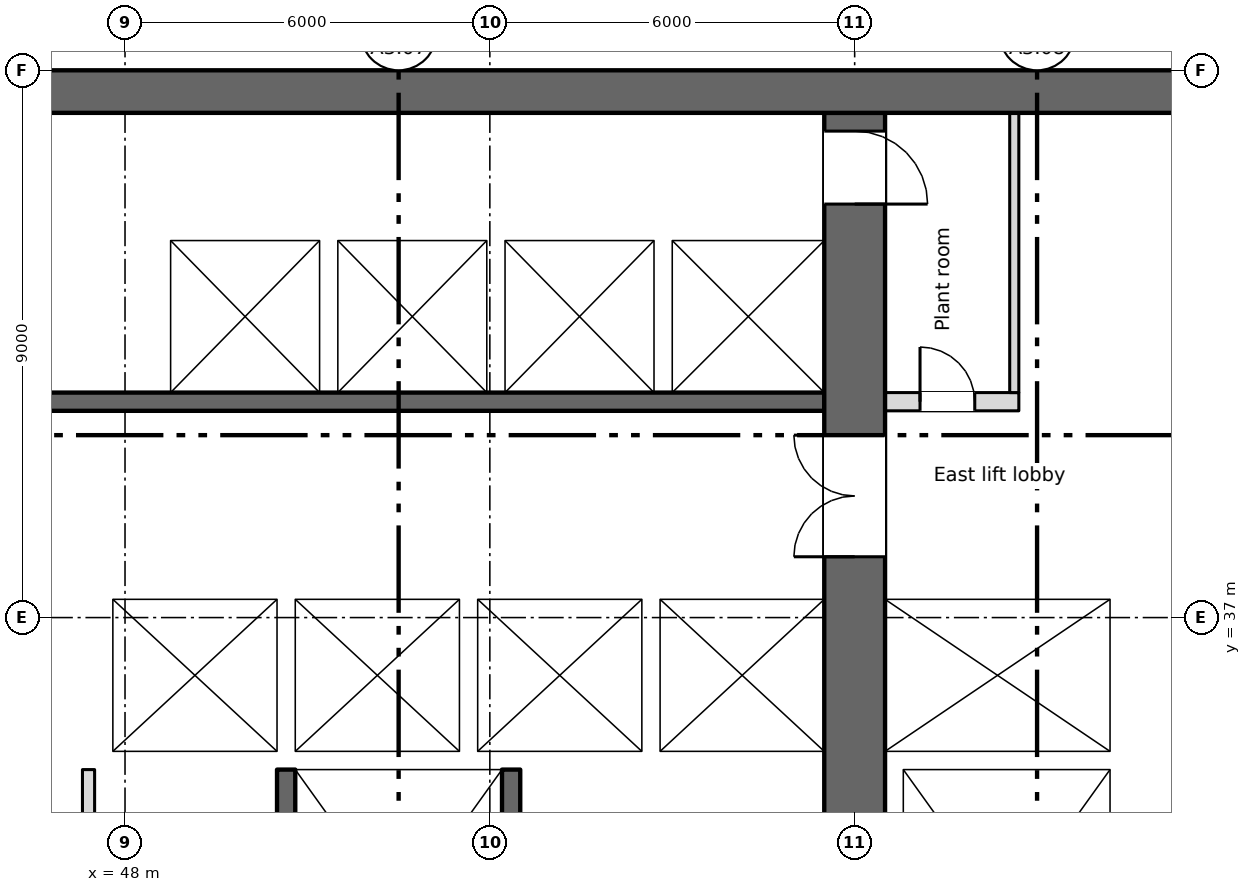
"""IFC4 building model, lengths in metres.
Left out: names, types, materials, properties, quantities, classifications, styles, units other than length and angle.
Written with IfcOpenShell. Run it as: python <this file> out.ifc"""

import sys

from ifc_helpers import new_model, si_unit, direction, frame, frame_2d, origin, place, context, subcontext, project, spatial, rectangle, extrude, element, fill, save


model = new_model("IFC4")
c1 = context("Model", 3, precision=1e-05, world=origin(), true_north=direction((0.0, 1.0)))
c2 = subcontext(c1, "Body", "Model", "MODEL_VIEW")
j1 = project(units=[si_unit("LENGTHUNIT", "METRE"), si_unit("PLANEANGLEUNIT", "RADIAN")], contexts=[c1])
p1 = place(None, origin())
s1 = spatial("IfcSite", under=j1, at=p1, CompositionType="ELEMENT")
p2 = place(p1, origin())
s2 = spatial("IfcBuilding", under=s1, at=p2, CompositionType="ELEMENT")
p3 = place(p2, frame((0.0, 0.0, 226.75)))
s3 = spatial("IfcBuildingStorey", under=s2, at=p3, CompositionType="ELEMENT", Elevation=226.75)
p4 = place(p3, frame((11.55, 45.65, 0.0), z_axis=(0.0, 0.0, 1.0), x_axis=(1.0, 0.0, 0.0)))
e1 = element("IfcWall", 1, at=p4, inside=s3, PredefinedType="SHEAR", context=c2, shape_type="SweptSolid", body=[
    extrude(rectangle(XDim=54.9, YDim=0.7, at=frame_2d((27.45, 0.0))), origin(), (0.0, 0.0, 1.0), 4.2),
])
p5 = place(p3, frame((64.35, 34.8, 0.0), z_axis=(0.0, 0.0, 1.0), x_axis=(0.0, 1.0, 0.0)))
e2 = element("IfcWall", 2, at=p5, inside=s3, PredefinedType="SHEAR", context=c2, shape_type="SweptSolid", body=[
    extrude(rectangle(XDim=10.5, YDim=0.3, at=frame_2d((5.25, 0.0))), origin(), (0.0, 0.0, 1.0), 4.2),
])
p6 = place(p3, frame((60.0, 28.4, 0.0), z_axis=(0.0, 0.0, 1.0), x_axis=(0.0, 1.0, 0.0)))
e3 = element("IfcWall", 3, at=p6, inside=s3, PredefinedType="SHEAR", context=c2, shape_type="SweptSolid", body=[
    extrude(rectangle(XDim=16.9, YDim=1.0, at=frame_2d((8.45, 0.0))), origin(), (0.0, 0.0, 1.0), 4.2),
])
p7 = place(p6, frame((9.6, 0.0, 0.0)))
e4 = element("IfcOpeningElement", 4, at=p7, cuts=e3, PredefinedType="OPENING", context=c2, shape_type="SweptSolid", body=[
    extrude(rectangle(XDim=2.0, YDim=2.1, at=frame_2d((1.0, 1.05))), frame((0.0, 0.51, 0.0), z_axis=(0.0, -1.0, 0.0), x_axis=(1.0, 0.0, 0.0)), (0.0, 0.0, 1.0), 1.02),
])
p8 = place(p6, frame((15.4, 0.0, 0.0)))
e5 = element("IfcOpeningElement", 5, at=p8, cuts=e3, PredefinedType="OPENING", context=c2, shape_type="SweptSolid", body=[
    extrude(rectangle(XDim=1.2, YDim=2.1, at=frame_2d((0.6, 1.05))), frame((0.0, 0.51, 0.0), z_axis=(0.0, -1.0, 0.0), x_axis=(1.0, 0.0, 0.0)), (0.0, 0.0, 1.0), 1.02),
])
p9 = place(p3, frame((50.65, 34.5, 0.0), z_axis=(0.0, 0.0, 1.0), x_axis=(0.0, -1.0, 0.0)))
e6 = element("IfcWall", 6, at=p9, inside=s3, PredefinedType="SHEAR", context=c2, shape_type="SweptSolid", body=[
    extrude(rectangle(XDim=6.1, YDim=0.3, at=frame_2d((3.05, 0.0))), origin(), (0.0, 0.0, 1.0), 4.2),
])
p10 = place(p9, frame((4.95, 0.0, 0.0)))
e7 = element("IfcOpeningElement", 7, at=p10, cuts=e6, PredefinedType="OPENING", context=c2, shape_type="SweptSolid", body=[
    extrude(rectangle(XDim=1.1, YDim=2.1, at=frame_2d((0.55, 1.05))), frame((0.0, 0.16, 0.0), z_axis=(0.0, -1.0, 0.0), x_axis=(1.0, 0.0, 0.0)), (0.0, 0.0, 1.0), 0.32),
])
p11 = place(p3, frame((54.35, 28.4, 0.0), z_axis=(0.0, 0.0, 1.0), x_axis=(0.0, 1.0, 0.0)))
e8 = element("IfcWall", 8, at=p11, inside=s3, PredefinedType="SHEAR", context=c2, shape_type="SweptSolid", body=[
    extrude(rectangle(XDim=6.1, YDim=0.3, at=frame_2d((3.05, 0.0))), origin(), (0.0, 0.0, 1.0), 4.2),
])
p12 = place(p11, frame((0.1, 0.0, 0.0)))
e9 = element("IfcOpeningElement", 9, at=p12, cuts=e8, PredefinedType="OPENING", context=c2, shape_type="SweptSolid", body=[
    extrude(rectangle(XDim=1.0, YDim=2.1, at=frame_2d((0.5, 1.05))), frame((0.0, 0.16, 0.0), z_axis=(0.0, -1.0, 0.0), x_axis=(1.0, 0.0, 0.0)), (0.0, 0.0, 1.0), 0.32),
])
for number, where, z_axis, x_axis in (
    (10, (60.65, 28.4, 0.0), (0.0, 0.0, 1.0), (0.0, 1.0, 0.0)),
    (11, (64.35, 28.4, 0.0), (0.0, 0.0, 1.0), (0.0, 1.0, 0.0)),
):
    element("IfcWall", number, at=place(p3, frame(where, z_axis=z_axis, x_axis=x_axis)), inside=s3, PredefinedType="SHEAR", context=c2, shape_type="SweptSolid", body=[
        extrude(rectangle(XDim=6.1, YDim=0.3, at=frame_2d((3.05, 0.0))), origin(), (0.0, 0.0, 1.0), 4.2),
    ])
p13 = place(p3, frame((47.3, 34.65, 0.0), z_axis=(0.0, 0.0, 1.0), x_axis=(1.0, 0.0, 0.0)))
e12 = element("IfcWall", 12, at=p13, inside=s3, PredefinedType="SHEAR", context=c2, shape_type="SweptSolid", body=[
    extrude(rectangle(XDim=12.2, YDim=0.3, at=frame_2d((6.1, 0.0))), origin(), (0.0, 0.0, 1.0), 4.2),
])
p14 = place(p13, frame((1.3, 0.0, 0.0)))
e13 = element("IfcOpeningElement", 13, at=p14, cuts=e12, PredefinedType="OPENING", context=c2, shape_type="SweptSolid", body=[
    extrude(rectangle(XDim=1.1, YDim=2.1, at=frame_2d((0.55, 1.05))), frame((0.0, 0.16, 0.0), z_axis=(0.0, -1.0, 0.0), x_axis=(1.0, 0.0, 0.0)), (0.0, 0.0, 1.0), 0.32),
])
p15 = place(p3, frame((60.5, 34.65, 0.0), z_axis=(0.0, 0.0, 1.0), x_axis=(1.0, 0.0, 0.0)))
e14 = element("IfcWall", 14, at=p15, inside=s3, PredefinedType="SHEAR", context=c2, shape_type="SweptSolid", body=[
    extrude(rectangle(XDim=4.0, YDim=0.3, at=frame_2d((2.0, 0.0))), origin(), (0.0, 0.0, 1.0), 4.2),
])
p16 = place(p3, frame((47.3, 37.45, 0.0), z_axis=(0.0, 0.0, 1.0), x_axis=(1.0, 0.0, 0.0)))
e15 = element("IfcWall", 15, at=p16, inside=s3, PredefinedType="SHEAR", context=c2, shape_type="SweptSolid", body=[
    extrude(rectangle(XDim=12.2, YDim=0.3, at=frame_2d((6.1, 0.0))), origin(), (0.0, 0.0, 1.0), 4.2),
])
p17 = place(p16, frame((4.3, 0.0, 0.0)))
e16 = element("IfcOpeningElement", 16, at=p17, cuts=e15, PredefinedType="OPENING", context=c2, shape_type="SweptSolid", body=[
    extrude(rectangle(XDim=1.1, YDim=2.1, at=frame_2d((0.55, 1.05))), frame((0.0, 0.16, 0.0), z_axis=(0.0, -1.0, 0.0), x_axis=(1.0, 0.0, 0.0)), (0.0, 0.0, 1.0), 0.32),
])
p18 = place(p16, frame((7.3, 0.0, 0.0)))
e17 = element("IfcOpeningElement", 17, at=p18, cuts=e15, PredefinedType="OPENING", context=c2, shape_type="SweptSolid", body=[
    extrude(rectangle(XDim=1.1, YDim=2.1, at=frame_2d((0.55, 1.05))), frame((0.0, 0.16, 0.0), z_axis=(0.0, -1.0, 0.0), x_axis=(1.0, 0.0, 0.0)), (0.0, 0.0, 1.0), 0.32),
])
p19 = place(p16, frame((10.3, 0.0, 0.0)))
e18 = element("IfcOpeningElement", 18, at=p19, cuts=e15, PredefinedType="OPENING", context=c2, shape_type="SweptSolid", body=[
    extrude(rectangle(XDim=1.1, YDim=2.1, at=frame_2d((0.55, 1.05))), frame((0.0, 0.16, 0.0), z_axis=(0.0, -1.0, 0.0), x_axis=(1.0, 0.0, 0.0)), (0.0, 0.0, 1.0), 0.32),
])
p20 = place(p3, frame((60.5, 37.45, 0.0), z_axis=(0.0, 0.0, 1.0), x_axis=(1.0, 0.0, 0.0)))
e19 = element("IfcWall", 19, at=p20, inside=s3, PredefinedType="SHEAR", context=c2, shape_type="SweptSolid", body=[
    extrude(rectangle(XDim=3.7, YDim=0.3, at=frame_2d((1.85, 0.0))), origin(), (0.0, 0.0, 1.0), 4.2),
])
p21 = place(p20, frame((1.3, 0.0, 0.0)))
e20 = element("IfcOpeningElement", 20, at=p21, cuts=e19, PredefinedType="OPENING", context=c2, shape_type="SweptSolid", body=[
    extrude(rectangle(XDim=1.1, YDim=2.1, at=frame_2d((0.55, 1.05))), frame((0.0, 0.16, 0.0), z_axis=(0.0, -1.0, 0.0), x_axis=(1.0, 0.0, 0.0)), (0.0, 0.0, 1.0), 0.32),
])
p22 = place(p3, frame((47.55, 34.8, 0.0), z_axis=(0.0, 0.0, 1.0), x_axis=(0.0, 1.0, 0.0)))
e21 = element("IfcWall", 21, at=p22, inside=s3, PredefinedType="SHEAR", context=c2, shape_type="SweptSolid", body=[
    extrude(rectangle(XDim=2.5, YDim=0.5, at=frame_2d((1.25, 0.0))), origin(), (0.0, 0.0, 1.0), 4.2),
])
p23 = place(p3, frame((50.65, 34.8, 0.0), z_axis=(0.0, 0.0, 1.0), x_axis=(0.0, 1.0, 0.0)))
e22 = element("IfcWall", 22, at=p23, inside=s3, PredefinedType="SHEAR", context=c2, shape_type="SweptSolid", body=[
    extrude(rectangle(XDim=2.5, YDim=0.3, at=frame_2d((1.25, 0.0))), origin(), (0.0, 0.0, 1.0), 4.2),
])
p24 = place(p3, frame((18.5, 40.55, 0.0), z_axis=(0.0, 0.0, 1.0), x_axis=(1.0, 0.0, 0.0)))
e23 = element("IfcWall", 23, at=p24, inside=s3, PredefinedType="SHEAR", context=c2, shape_type="SweptSolid", body=[
    extrude(rectangle(XDim=41.0, YDim=0.3, at=frame_2d((20.5, 0.0))), origin(), (0.0, 0.0, 1.0), 4.2),
])
p25 = place(p24, frame((2.15, 0.0, 0.0)))
e24 = element("IfcOpeningElement", 24, at=p25, cuts=e23, PredefinedType="OPENING", context=c2, shape_type="SweptSolid", body=[
    extrude(rectangle(XDim=0.9, YDim=2.1, at=frame_2d((0.45, 1.05))), frame((0.0, 0.16, 0.0), z_axis=(0.0, -1.0, 0.0), x_axis=(1.0, 0.0, 0.0)), (0.0, 0.0, 1.0), 0.32),
])
p26 = place(p24, frame((15.9, 0.0, 0.0)))
e25 = element("IfcOpeningElement", 25, at=p26, cuts=e23, PredefinedType="OPENING", context=c2, shape_type="SweptSolid", body=[
    extrude(rectangle(XDim=0.9, YDim=2.1, at=frame_2d((0.45, 1.05))), frame((0.0, 0.16, 0.0), z_axis=(0.0, -1.0, 0.0), x_axis=(1.0, 0.0, 0.0)), (0.0, 0.0, 1.0), 0.32),
])
p27 = place(p24, frame((21.4, 0.0, 0.0)))
e26 = element("IfcOpeningElement", 26, at=p27, cuts=e23, PredefinedType="OPENING", context=c2, shape_type="SweptSolid", body=[
    extrude(rectangle(XDim=0.9, YDim=2.1, at=frame_2d((0.45, 1.05))), frame((0.0, 0.16, 0.0), z_axis=(0.0, -1.0, 0.0), x_axis=(1.0, 0.0, 0.0)), (0.0, 0.0, 1.0), 0.32),
])
p28 = place(p24, frame((26.9, 0.0, 0.0)))
e27 = element("IfcOpeningElement", 27, at=p28, cuts=e23, PredefinedType="OPENING", context=c2, shape_type="SweptSolid", body=[
    extrude(rectangle(XDim=0.9, YDim=2.1, at=frame_2d((0.45, 1.05))), frame((0.0, 0.16, 0.0), z_axis=(0.0, -1.0, 0.0), x_axis=(1.0, 0.0, 0.0)), (0.0, 0.0, 1.0), 0.32),
])
p29 = place(p24, frame((6.175, 0.0, 0.0)))
e28 = element("IfcOpeningElement", 28, at=p29, cuts=e23, PredefinedType="OPENING", context=c2, shape_type="SweptSolid", body=[
    extrude(rectangle(XDim=1.1, YDim=2.1, at=frame_2d((0.55, 1.05))), frame((0.0, 0.16, 0.0), z_axis=(0.0, -1.0, 0.0), x_axis=(1.0, 0.0, 0.0)), (0.0, 0.0, 1.0), 0.32),
])
p30 = place(p24, frame((8.925, 0.0, 0.0)))
e29 = element("IfcOpeningElement", 29, at=p30, cuts=e23, PredefinedType="OPENING", context=c2, shape_type="SweptSolid", body=[
    extrude(rectangle(XDim=1.1, YDim=2.1, at=frame_2d((0.55, 1.05))), frame((0.0, 0.16, 0.0), z_axis=(0.0, -1.0, 0.0), x_axis=(1.0, 0.0, 0.0)), (0.0, 0.0, 1.0), 0.32),
])
p31 = place(p24, frame((11.675, 0.0, 0.0)))
e30 = element("IfcOpeningElement", 30, at=p31, cuts=e23, PredefinedType="OPENING", context=c2, shape_type="SweptSolid", body=[
    extrude(rectangle(XDim=1.1, YDim=2.1, at=frame_2d((0.55, 1.05))), frame((0.0, 0.16, 0.0), z_axis=(0.0, -1.0, 0.0), x_axis=(1.0, 0.0, 0.0)), (0.0, 0.0, 1.0), 0.32),
])
p32 = place(p24, frame((30.925, 0.0, 0.0)))
e31 = element("IfcOpeningElement", 31, at=p32, cuts=e23, PredefinedType="OPENING", context=c2, shape_type="SweptSolid", body=[
    extrude(rectangle(XDim=1.1, YDim=2.1, at=frame_2d((0.55, 1.05))), frame((0.0, 0.16, 0.0), z_axis=(0.0, -1.0, 0.0), x_axis=(1.0, 0.0, 0.0)), (0.0, 0.0, 1.0), 0.32),
])
p33 = place(p24, frame((33.675, 0.0, 0.0)))
e32 = element("IfcOpeningElement", 32, at=p33, cuts=e23, PredefinedType="OPENING", context=c2, shape_type="SweptSolid", body=[
    extrude(rectangle(XDim=1.1, YDim=2.1, at=frame_2d((0.55, 1.05))), frame((0.0, 0.16, 0.0), z_axis=(0.0, -1.0, 0.0), x_axis=(1.0, 0.0, 0.0)), (0.0, 0.0, 1.0), 0.32),
])
p34 = place(p24, frame((36.375, 0.0, 0.0)))
e33 = element("IfcOpeningElement", 33, at=p34, cuts=e23, PredefinedType="OPENING", context=c2, shape_type="SweptSolid", body=[
    extrude(rectangle(XDim=1.2, YDim=2.1, at=frame_2d((0.6, 1.05))), frame((0.0, 0.16, 0.0), z_axis=(0.0, -1.0, 0.0), x_axis=(1.0, 0.0, 0.0)), (0.0, 0.0, 1.0), 0.32),
])
p35 = place(p24, frame((39.15, 0.0, 0.0)))
e34 = element("IfcOpeningElement", 34, at=p35, cuts=e23, PredefinedType="OPENING", context=c2, shape_type="SweptSolid", body=[
    extrude(rectangle(XDim=1.2, YDim=2.1, at=frame_2d((0.6, 1.05))), frame((0.0, 0.16, 0.0), z_axis=(0.0, -1.0, 0.0), x_axis=(1.0, 0.0, 0.0)), (0.0, 0.0, 1.0), 0.32),
])
p36 = place(p3, frame((18.5, 43.35, 0.0), z_axis=(0.0, 0.0, 1.0), x_axis=(1.0, 0.0, 0.0)))
e35 = element("IfcWall", 35, at=p36, inside=s3, PredefinedType="SHEAR", context=c2, shape_type="SweptSolid", body=[
    extrude(rectangle(XDim=41.0, YDim=0.3, at=frame_2d((20.5, 0.0))), origin(), (0.0, 0.0, 1.0), 4.2),
])
p37 = place(p3, frame((60.5, 40.55, 0.0), z_axis=(0.0, 0.0, 1.0), x_axis=(1.0, 0.0, 0.0)))
e36 = element("IfcWall", 36, at=p37, inside=s3, PredefinedType="PARTITIONING", context=c2, shape_type="SweptSolid", body=[
    extrude(rectangle(XDim=2.2, YDim=0.3, at=frame_2d((1.1, 0.0))), origin(), (0.0, 0.0, 1.0), 4.2),
])
p38 = place(p37, frame((0.575, 0.0, 0.0)))
e37 = element("IfcOpeningElement", 37, at=p38, cuts=e36, PredefinedType="OPENING", context=c2, shape_type="SweptSolid", body=[
    extrude(rectangle(XDim=0.9, YDim=2.1, at=frame_2d((0.45, 1.05))), frame((0.0, 0.16, 0.0), z_axis=(0.0, -1.0, 0.0), x_axis=(1.0, 0.0, 0.0)), (0.0, 0.0, 1.0), 0.32),
])
for number, where, z_axis, x_axis in (
    (38, (53.65, 34.8, 0.0), (0.0, 0.0, 1.0), (0.0, 1.0, 0.0)),
    (39, (56.65, 34.8, 0.0), (0.0, 0.0, 1.0), (0.0, 1.0, 0.0)),
    (40, (48.6, 40.7, 0.0), (0.0, 0.0, 1.0), (0.0, 1.0, 0.0)),
    (41, (51.35, 40.7, 0.0), (0.0, 0.0, 1.0), (0.0, 1.0, 0.0)),
    (42, (54.1, 40.7, 0.0), (0.0, 0.0, 1.0), (0.0, 1.0, 0.0)),
    (43, (56.85, 40.7, 0.0), (0.0, 0.0, 1.0), (0.0, 1.0, 0.0)),
):
    element("IfcWall", number, at=place(p3, frame(where, z_axis=z_axis, x_axis=x_axis)), inside=s3, PredefinedType="SHEAR", context=c2, shape_type="SweptSolid", body=[
        extrude(rectangle(XDim=2.5, YDim=0.3, at=frame_2d((1.25, 0.0))), origin(), (0.0, 0.0, 1.0), 4.2),
    ])
p39 = place(p3, frame((47.4, 28.4, 0.0), z_axis=(0.0, 0.0, 1.0), x_axis=(0.0, 1.0, 0.0)))
e44 = element("IfcWall", 44, at=p39, inside=s3, PredefinedType="PARTITIONING", context=c2, shape_type="SweptSolid", body=[
    extrude(rectangle(XDim=6.1, YDim=0.2, at=frame_2d((3.05, 0.0))), origin(), (0.0, 0.0, 1.0), 4.2),
])
p40 = place(p3, frame((62.625, 40.7, 0.0), z_axis=(0.0, 0.0, 1.0), x_axis=(0.0, 1.0, 0.0)))
e45 = element("IfcWall", 45, at=p40, inside=s3, PredefinedType="PARTITIONING", context=c2, shape_type="SweptSolid", body=[
    extrude(rectangle(XDim=4.6, YDim=0.15, at=frame_2d((2.3, 0.0))), origin(), (0.0, 0.0, 1.0), 4.2),
])
p41 = place(p38, origin())
e46 = element("IfcDoor", 46, at=p41, inside=s3, OperationType="SINGLE_SWING_LEFT", PredefinedType="DOOR", context=c2, shape_type="SweptSolid", body=[
    extrude(rectangle(XDim=0.9, YDim=2.1, at=frame_2d((0.45, 1.05))), frame((0.0, 0.025, 0.0), z_axis=(0.0, -1.0, 0.0), x_axis=(1.0, 0.0, 0.0)), (0.0, 0.0, 1.0), 0.05),
])
fill(e37, e46)
p42 = place(p17, origin())
e47 = element("IfcDoor", 47, at=p42, inside=s3, OperationType="SLIDING_TO_LEFT", PredefinedType="DOOR", context=c2, shape_type="SweptSolid", body=[
    extrude(rectangle(XDim=1.1, YDim=2.1, at=frame_2d((0.55, 1.05))), frame((0.0, 0.025, 0.0), z_axis=(0.0, -1.0, 0.0), x_axis=(1.0, 0.0, 0.0)), (0.0, 0.0, 1.0), 0.05),
])
fill(e16, e47)
p43 = place(p18, origin())
e48 = element("IfcDoor", 48, at=p43, inside=s3, OperationType="SLIDING_TO_LEFT", PredefinedType="DOOR", context=c2, shape_type="SweptSolid", body=[
    extrude(rectangle(XDim=1.1, YDim=2.1, at=frame_2d((0.55, 1.05))), frame((0.0, 0.025, 0.0), z_axis=(0.0, -1.0, 0.0), x_axis=(1.0, 0.0, 0.0)), (0.0, 0.0, 1.0), 0.05),
])
fill(e17, e48)
p44 = place(p19, origin())
e49 = element("IfcDoor", 49, at=p44, inside=s3, OperationType="SLIDING_TO_LEFT", PredefinedType="DOOR", context=c2, shape_type="SweptSolid", body=[
    extrude(rectangle(XDim=1.1, YDim=2.1, at=frame_2d((0.55, 1.05))), frame((0.0, 0.025, 0.0), z_axis=(0.0, -1.0, 0.0), x_axis=(1.0, 0.0, 0.0)), (0.0, 0.0, 1.0), 0.05),
])
fill(e18, e49)
p45 = place(p32, origin())
e50 = element("IfcDoor", 50, at=p45, inside=s3, OperationType="SLIDING_TO_LEFT", PredefinedType="DOOR", context=c2, shape_type="SweptSolid", body=[
    extrude(rectangle(XDim=1.1, YDim=2.1, at=frame_2d((0.55, 1.05))), frame((0.0, 0.025, 0.0), z_axis=(0.0, -1.0, 0.0), x_axis=(1.0, 0.0, 0.0)), (0.0, 0.0, 1.0), 0.05),
])
fill(e31, e50)
p46 = place(p33, origin())
e51 = element("IfcDoor", 51, at=p46, inside=s3, OperationType="SLIDING_TO_LEFT", PredefinedType="DOOR", context=c2, shape_type="SweptSolid", body=[
    extrude(rectangle(XDim=1.1, YDim=2.1, at=frame_2d((0.55, 1.05))), frame((0.0, 0.025, 0.0), z_axis=(0.0, -1.0, 0.0), x_axis=(1.0, 0.0, 0.0)), (0.0, 0.0, 1.0), 0.05),
])
fill(e32, e51)
p47 = place(p34, origin())
e52 = element("IfcDoor", 52, at=p47, inside=s3, OperationType="SLIDING_TO_LEFT", PredefinedType="DOOR", context=c2, shape_type="SweptSolid", body=[
    extrude(rectangle(XDim=1.2, YDim=2.1, at=frame_2d((0.6, 1.05))), frame((0.0, 0.025, 0.0), z_axis=(0.0, -1.0, 0.0), x_axis=(1.0, 0.0, 0.0)), (0.0, 0.0, 1.0), 0.05),
])
fill(e33, e52)
p48 = place(p35, origin())
e53 = element("IfcDoor", 53, at=p48, inside=s3, OperationType="SLIDING_TO_LEFT", PredefinedType="DOOR", context=c2, shape_type="SweptSolid", body=[
    extrude(rectangle(XDim=1.2, YDim=2.1, at=frame_2d((0.6, 1.05))), frame((0.0, 0.025, 0.0), z_axis=(0.0, -1.0, 0.0), x_axis=(1.0, 0.0, 0.0)), (0.0, 0.0, 1.0), 0.05),
])
fill(e34, e53)
p49 = place(p21, origin())
e54 = element("IfcDoor", 54, at=p49, inside=s3, OperationType="SLIDING_TO_LEFT", PredefinedType="DOOR", context=c2, shape_type="SweptSolid", body=[
    extrude(rectangle(XDim=1.1, YDim=2.1, at=frame_2d((0.55, 1.05))), frame((0.0, 0.025, 0.0), z_axis=(0.0, -1.0, 0.0), x_axis=(1.0, 0.0, 0.0)), (0.0, 0.0, 1.0), 0.05),
])
fill(e20, e54)
p50 = place(p14, origin())
e55 = element("IfcDoor", 55, at=p50, inside=s3, OperationType="SLIDING_TO_LEFT", PredefinedType="DOOR", context=c2, shape_type="SweptSolid", body=[
    extrude(rectangle(XDim=1.1, YDim=2.1, at=frame_2d((0.55, 1.05))), frame((0.0, 0.025, 0.0), z_axis=(0.0, -1.0, 0.0), x_axis=(1.0, 0.0, 0.0)), (0.0, 0.0, 1.0), 0.05),
])
fill(e13, e55)
p51 = place(p7, origin())
e56 = element("IfcDoor", 56, at=p51, inside=s3, OperationType="DOUBLE_DOOR_SINGLE_SWING", PredefinedType="DOOR", context=c2, shape_type="SweptSolid", body=[
    extrude(rectangle(XDim=2.0, YDim=2.1, at=frame_2d((1.0, 1.05))), frame((0.0, 0.025, 0.0), z_axis=(0.0, -1.0, 0.0), x_axis=(1.0, 0.0, 0.0)), (0.0, 0.0, 1.0), 0.05),
])
fill(e4, e56)
p52 = place(p8, origin())
e57 = element("IfcDoor", 57, at=p52, inside=s3, OperationType="SINGLE_SWING_LEFT", PredefinedType="DOOR", context=c2, shape_type="SweptSolid", body=[
    extrude(rectangle(XDim=1.2, YDim=2.1, at=frame_2d((0.6, 1.05))), frame((0.0, 0.025, 0.0), z_axis=(0.0, -1.0, 0.0), x_axis=(1.0, 0.0, 0.0)), (0.0, 0.0, 1.0), 0.05),
])
fill(e5, e57)
save(model, sys.argv[1])
